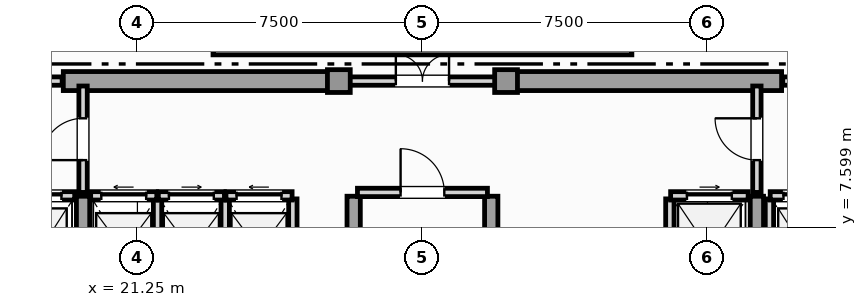
"""IFC4 building model, lengths in metres.
Left out: names, types, materials, properties, quantities, classifications, styles, units other than length and angle.
Written with IfcOpenShell. Run it as: python <this file> out.ifc"""

import sys

from ifc_helpers import new_model, si_unit, direction, frame, frame_2d, origin, origin_2d, place, context, subcontext, project, spatial, rectangle, extrude, element, fill, save


model = new_model("IFC4")
c1 = context("Model", 3, precision=1e-05, world=origin(), true_north=direction((0.0, 1.0)))
c2 = subcontext(c1, "Body", "Model", "MODEL_VIEW")
j1 = project(units=[si_unit("LENGTHUNIT", "METRE"), si_unit("PLANEANGLEUNIT", "RADIAN")], contexts=[c1])
p1 = place(None, origin())
s1 = spatial("IfcSite", under=j1, at=p1, CompositionType="ELEMENT")
p2 = place(p1, origin())
s2 = spatial("IfcBuilding", under=s1, at=p2, CompositionType="ELEMENT")
p3 = place(p2, frame((0.0, 0.0, 337.5)))
s3 = spatial("IfcBuildingStorey", under=s2, at=p3, CompositionType="ELEMENT", Elevation=337.5)
for number, where, z_axis, x_axis in (
    (1, (19.3, 11.45, 0.0), (0.0, 0.0, 1.0), (1.0, 0.0, 0.0)),
    (2, (30.9, 11.45, 0.0), (0.0, 0.0, 1.0), (1.0, 0.0, 0.0)),
):
    element("IfcWall", number, at=place(p3, frame(where, z_axis=z_axis, x_axis=x_axis)), inside=s3, PredefinedType="SHEAR", context=c2, shape_type="SweptSolid", body=[
        extrude(rectangle(XDim=7.3, YDim=0.5, at=frame_2d((3.65, 0.0))), origin(), (0.0, 0.0, 1.0), 3.63),
    ])
for number, where, z_axis, x_axis in (
    (3, (19.82, 0.92, 0.0), (0.0, 0.0, 1.0), (0.0, 1.0, 0.0)),
    (4, (26.94, 0.92, 0.0), (0.0, 0.0, 1.0), (0.0, 1.0, 0.0)),
    (5, (30.56, 0.92, 0.0), (0.0, 0.0, 1.0), (0.0, 1.0, 0.0)),
    (6, (37.55, 0.92, 0.0), (0.0, 0.0, 1.0), (0.0, 1.0, 0.0)),
):
    element("IfcWall", number, at=place(p3, frame(where, z_axis=z_axis, x_axis=x_axis)), inside=s3, PredefinedType="SHEAR", context=c2, shape_type="SweptSolid", body=[
        extrude(rectangle(XDim=7.5, YDim=0.35, at=frame_2d((3.75, 0.0))), origin(), (0.0, 0.0, 1.0), 3.63),
    ])
for number, where, z_axis, x_axis in (
    (7, (26.55, 11.45, 0.0), (0.0, 0.0, 1.0), (1.0, 0.0, 0.0)),
    (8, (30.95, 11.45, 0.0), (0.0, 0.0, 1.0), (1.0, 0.0, 0.0)),
):
    element("IfcColumn", number, at=place(p3, frame(where, z_axis=z_axis, x_axis=x_axis)), inside=s3, PredefinedType="COLUMN", context=c2, shape_type="SweptSolid", body=[
        extrude(rectangle(XDim=0.6, YDim=0.6, at=origin_2d()), origin(), (0.0, 0.0, 1.0), 3.85),
    ])
p4 = place(p3, frame((34.26, 12.27, 0.0), z_axis=(0.0, 0.0, 1.0), x_axis=(-1.0, 0.0, 0.0)))
e9 = element("IfcWall", 9, at=p4, inside=s3, PredefinedType="SOLIDWALL", context=c2, shape_type="SweptSolid", body=[
    extrude(rectangle(XDim=11.02, YDim=0.26, at=frame_2d((5.51, 0.0))), origin(), (0.0, 0.0, 1.0), 3.63),
])
p5 = place(p3, frame((17.78, 8.43, 0.0), z_axis=(0.0, 0.0, 1.0), x_axis=(1.0, 0.0, 0.0)))
e10 = element("IfcWall", 10, at=p5, inside=s3, PredefinedType="SOLIDWALL", context=c2, shape_type="SweptSolid", body=[
    extrude(rectangle(XDim=1.82, YDim=0.22, at=frame_2d((0.91, 0.0))), origin(), (0.0, 0.0, 1.0), 3.63),
])
p6 = place(p5, frame((0.35, 0.0, 0.0)))
e11 = element("IfcOpeningElement", 11, at=p6, cuts=e10, PredefinedType="OPENING", context=c2, shape_type="SweptSolid", body=[
    extrude(rectangle(XDim=1.12, YDim=2.25, at=frame_2d((0.56, 1.125))), frame((0.0, 0.12, 0.0), z_axis=(0.0, -1.0, 0.0), x_axis=(1.0, 0.0, 0.0)), (0.0, 0.0, 1.0), 0.24),
])
p7 = place(p3, frame((37.88, 5.65, 0.0), z_axis=(0.0, 0.0, 1.0), x_axis=(0.0, 1.0, 0.0)))
e12 = element("IfcWall", 12, at=p7, inside=s3, PredefinedType="SOLIDWALL", context=c2, shape_type="SweptSolid", body=[
    extrude(rectangle(XDim=2.7, YDim=0.22, at=frame_2d((1.35, 0.0))), origin(), (0.0, 0.0, 1.0), 3.63),
])
p8 = place(p3, frame((37.9, 8.43, 0.0), z_axis=(0.0, 0.0, 1.0), x_axis=(1.0, 0.0, 0.0)))
e13 = element("IfcWall", 13, at=p8, inside=s3, PredefinedType="SOLIDWALL", context=c2, shape_type="SweptSolid", body=[
    extrude(rectangle(XDim=1.82, YDim=0.22, at=frame_2d((0.91, 0.0))), origin(), (0.0, 0.0, 1.0), 3.63),
])
p9 = place(p8, frame((0.35, 0.0, 0.0)))
e14 = element("IfcOpeningElement", 14, at=p9, cuts=e13, PredefinedType="OPENING", context=c2, shape_type="SweptSolid", body=[
    extrude(rectangle(XDim=1.12, YDim=2.25, at=frame_2d((0.56, 1.125))), frame((0.0, 0.12, 0.0), z_axis=(0.0, -1.0, 0.0), x_axis=(1.0, 0.0, 0.0)), (0.0, 0.0, 1.0), 0.24),
])
p10 = place(p3, frame((35.26, 5.65, 0.0), z_axis=(0.0, 0.0, 1.0), x_axis=(0.0, 1.0, 0.0)))
e15 = element("IfcWall", 15, at=p10, inside=s3, PredefinedType="SOLIDWALL", context=c2, shape_type="SweptSolid", body=[
    extrude(rectangle(XDim=2.7, YDim=0.22, at=frame_2d((1.35, 0.0))), origin(), (0.0, 0.0, 1.0), 3.63),
])
p11 = place(p3, frame((35.28, 8.43, 0.0), z_axis=(0.0, 0.0, 1.0), x_axis=(1.0, 0.0, 0.0)))
e16 = element("IfcWall", 16, at=p11, inside=s3, PredefinedType="SOLIDWALL", context=c2, shape_type="SweptSolid", body=[
    extrude(rectangle(XDim=2.04, YDim=0.22, at=frame_2d((1.02, 0.0))), origin(), (0.0, 0.0, 1.0), 3.63),
])
p12 = place(p11, frame((0.43, 0.0, 0.0)))
e17 = element("IfcOpeningElement", 17, at=p12, cuts=e16, PredefinedType="OPENING", context=c2, shape_type="SweptSolid", body=[
    extrude(rectangle(XDim=1.18, YDim=2.2, at=frame_2d((0.59, 1.1))), frame((0.0, 0.12, 0.0), z_axis=(0.0, -1.0, 0.0), x_axis=(1.0, 0.0, 0.0)), (0.0, 0.0, 1.0), 0.24),
])
p13 = place(p3, frame((21.78, 5.65, 0.0), z_axis=(0.0, 0.0, 1.0), x_axis=(0.0, 1.0, 0.0)))
e18 = element("IfcWall", 18, at=p13, inside=s3, PredefinedType="SOLIDWALL", context=c2, shape_type="SweptSolid", body=[
    extrude(rectangle(XDim=2.7, YDim=0.22, at=frame_2d((1.35, 0.0))), origin(), (0.0, 0.0, 1.0), 3.63),
])
p14 = place(p3, frame((20.02, 8.43, 0.0), z_axis=(0.0, 0.0, 1.0), x_axis=(1.0, 0.0, 0.0)))
e19 = element("IfcWall", 19, at=p14, inside=s3, PredefinedType="SOLIDWALL", context=c2, shape_type="SweptSolid", body=[
    extrude(rectangle(XDim=1.74, YDim=0.22, at=frame_2d((0.87, 0.0))), origin(), (0.0, 0.0, 1.0), 3.63),
])
p15 = place(p14, frame((0.28, 0.0, 0.0)))
e20 = element("IfcOpeningElement", 20, at=p15, cuts=e19, PredefinedType="OPENING", context=c2, shape_type="SweptSolid", body=[
    extrude(rectangle(XDim=1.18, YDim=2.2, at=frame_2d((0.59, 1.1))), frame((0.0, 0.12, 0.0), z_axis=(0.0, -1.0, 0.0), x_axis=(1.0, 0.0, 0.0)), (0.0, 0.0, 1.0), 0.24),
])
p16 = place(p3, frame((23.56, 5.65, 0.0), z_axis=(0.0, 0.0, 1.0), x_axis=(0.0, 1.0, 0.0)))
e21 = element("IfcWall", 21, at=p16, inside=s3, PredefinedType="SOLIDWALL", context=c2, shape_type="SweptSolid", body=[
    extrude(rectangle(XDim=2.7, YDim=0.22, at=frame_2d((1.35, 0.0))), origin(), (0.0, 0.0, 1.0), 3.63),
])
p17 = place(p3, frame((21.8, 8.43, 0.0), z_axis=(0.0, 0.0, 1.0), x_axis=(1.0, 0.0, 0.0)))
e22 = element("IfcWall", 22, at=p17, inside=s3, PredefinedType="SOLIDWALL", context=c2, shape_type="SweptSolid", body=[
    extrude(rectangle(XDim=1.74, YDim=0.22, at=frame_2d((0.87, 0.0))), origin(), (0.0, 0.0, 1.0), 3.63),
])
p18 = place(p17, frame((0.28, 0.0, 0.0)))
e23 = element("IfcOpeningElement", 23, at=p18, cuts=e22, PredefinedType="OPENING", context=c2, shape_type="SweptSolid", body=[
    extrude(rectangle(XDim=1.18, YDim=2.2, at=frame_2d((0.59, 1.1))), frame((0.0, 0.12, 0.0), z_axis=(0.0, -1.0, 0.0), x_axis=(1.0, 0.0, 0.0)), (0.0, 0.0, 1.0), 0.24),
])
p19 = place(p3, frame((25.34, 5.65, 0.0), z_axis=(0.0, 0.0, 1.0), x_axis=(0.0, 1.0, 0.0)))
e24 = element("IfcWall", 24, at=p19, inside=s3, PredefinedType="SOLIDWALL", context=c2, shape_type="SweptSolid", body=[
    extrude(rectangle(XDim=2.7, YDim=0.22, at=frame_2d((1.35, 0.0))), origin(), (0.0, 0.0, 1.0), 3.63),
])
p20 = place(p3, frame((23.58, 8.43, 0.0), z_axis=(0.0, 0.0, 1.0), x_axis=(1.0, 0.0, 0.0)))
e25 = element("IfcWall", 25, at=p20, inside=s3, PredefinedType="SOLIDWALL", context=c2, shape_type="SweptSolid", body=[
    extrude(rectangle(XDim=1.74, YDim=0.22, at=frame_2d((0.87, 0.0))), origin(), (0.0, 0.0, 1.0), 3.63),
])
p21 = place(p20, frame((0.28, 0.0, 0.0)))
e26 = element("IfcOpeningElement", 26, at=p21, cuts=e25, PredefinedType="OPENING", context=c2, shape_type="SweptSolid", body=[
    extrude(rectangle(XDim=1.18, YDim=2.2, at=frame_2d((0.59, 1.1))), frame((0.0, 0.12, 0.0), z_axis=(0.0, -1.0, 0.0), x_axis=(1.0, 0.0, 0.0)), (0.0, 0.0, 1.0), 0.24),
])
p22 = place(p3, frame((27.04, 8.52, 0.0), z_axis=(0.0, 0.0, 1.0), x_axis=(1.0, 0.0, 0.0)))
e27 = element("IfcWall", 27, at=p22, inside=s3, PredefinedType="SOLIDWALL", context=c2, shape_type="SweptSolid", body=[
    extrude(rectangle(XDim=3.42, YDim=0.22, at=frame_2d((1.71, 0.0))), origin(), (0.0, 0.0, 1.0), 3.63),
])
p23 = place(p22, frame((1.135, 0.0, 0.0)))
e28 = element("IfcOpeningElement", 28, at=p23, cuts=e27, PredefinedType="OPENING", context=c2, shape_type="SweptSolid", body=[
    extrude(rectangle(XDim=1.15, YDim=2.2, at=frame_2d((0.575, 1.1))), frame((0.0, 0.12, 0.0), z_axis=(0.0, -1.0, 0.0), x_axis=(1.0, 0.0, 0.0)), (0.0, 0.0, 1.0), 0.24),
])
p24 = place(p3, frame((19.82, 8.52, 0.0), z_axis=(0.0, 0.0, 1.0), x_axis=(0.0, 1.0, 0.0)))
e29 = element("IfcWall", 29, at=p24, inside=s3, PredefinedType="SOLIDWALL", context=c2, shape_type="SweptSolid", body=[
    extrude(rectangle(XDim=2.8, YDim=0.22, at=frame_2d((1.4, 0.0))), origin(), (0.0, 0.0, 1.0), 3.085),
])
p25 = place(p24, frame((0.85, 0.0, 0.0)))
e30 = element("IfcOpeningElement", 30, at=p25, cuts=e29, PredefinedType="OPENING", context=c2, shape_type="SweptSolid", body=[
    extrude(rectangle(XDim=1.1, YDim=2.2, at=frame_2d((0.55, 1.1))), frame((0.0, 0.12, 0.0), z_axis=(0.0, -1.0, 0.0), x_axis=(1.0, 0.0, 0.0)), (0.0, 0.0, 1.0), 0.24),
])
p26 = place(p3, frame((37.55, 8.52, 0.0), z_axis=(0.0, 0.0, 1.0), x_axis=(0.0, 1.0, 0.0)))
e31 = element("IfcWall", 31, at=p26, inside=s3, PredefinedType="SOLIDWALL", context=c2, shape_type="SweptSolid", body=[
    extrude(rectangle(XDim=2.8, YDim=0.22, at=frame_2d((1.4, 0.0))), origin(), (0.0, 0.0, 1.0), 3.085),
])
p27 = place(p26, frame((0.85, 0.0, 0.0)))
e32 = element("IfcOpeningElement", 32, at=p27, cuts=e31, PredefinedType="OPENING", context=c2, shape_type="SweptSolid", body=[
    extrude(rectangle(XDim=1.1, YDim=2.2, at=frame_2d((0.55, 1.1))), frame((0.0, 0.12, 0.0), z_axis=(0.0, -1.0, 0.0), x_axis=(1.0, 0.0, 0.0)), (0.0, 0.0, 1.0), 0.24),
])
p28 = place(p3, frame((16.23, 11.45, 0.0), z_axis=(0.0, 0.0, 1.0), x_axis=(1.0, 0.0, 0.0)))
e33 = element("IfcWall", 33, at=p28, inside=s3, PredefinedType="SOLIDWALL", context=c2, shape_type="SweptSolid", body=[
    extrude(rectangle(XDim=3.04, YDim=0.22, at=frame_2d((1.52, 0.0))), origin(), (0.0, 0.0, 1.0), 3.63),
])
p29 = place(p28, frame((0.97, 0.0, 0.0)))
e34 = element("IfcOpeningElement", 34, at=p29, cuts=e33, PredefinedType="OPENING", context=c2, shape_type="SweptSolid", body=[
    extrude(rectangle(XDim=1.1, YDim=2.2, at=frame_2d((0.55, 1.1))), frame((0.0, 0.12, 0.0), z_axis=(0.0, -1.0, 0.0), x_axis=(1.0, 0.0, 0.0)), (0.0, 0.0, 1.0), 0.24),
])
p30 = place(p3, frame((26.63, 11.45, 0.0), z_axis=(0.0, 0.0, 1.0), x_axis=(1.0, 0.0, 0.0)))
e35 = element("IfcWall", 35, at=p30, inside=s3, PredefinedType="SOLIDWALL", context=c2, shape_type="SweptSolid", body=[
    extrude(rectangle(XDim=4.24, YDim=0.22, at=frame_2d((2.12, 0.0))), origin(), (0.0, 0.0, 1.0), 3.63),
])
p31 = place(p30, frame((1.42, 0.0, 0.0)))
e36 = element("IfcOpeningElement", 36, at=p31, cuts=e35, PredefinedType="OPENING", context=c2, shape_type="SweptSolid", body=[
    extrude(rectangle(XDim=1.4, YDim=2.2, at=frame_2d((0.7, 1.1))), frame((0.0, 0.12, 0.0), z_axis=(0.0, -1.0, 0.0), x_axis=(1.0, 0.0, 0.0)), (0.0, 0.0, 1.0), 0.24),
])
p32 = place(p3, frame((38.23, 11.45, 0.0), z_axis=(0.0, 0.0, 1.0), x_axis=(1.0, 0.0, 0.0)))
e37 = element("IfcWall", 37, at=p32, inside=s3, PredefinedType="SOLIDWALL", context=c2, shape_type="SweptSolid", body=[
    extrude(rectangle(XDim=3.04, YDim=0.22, at=frame_2d((1.52, 0.0))), origin(), (0.0, 0.0, 1.0), 3.63),
])
p33 = place(p32, frame((0.97, 0.0, 0.0)))
e38 = element("IfcOpeningElement", 38, at=p33, cuts=e37, PredefinedType="OPENING", context=c2, shape_type="SweptSolid", body=[
    extrude(rectangle(XDim=1.1, YDim=2.2, at=frame_2d((0.55, 1.1))), frame((0.0, 0.12, 0.0), z_axis=(0.0, -1.0, 0.0), x_axis=(1.0, 0.0, 0.0)), (0.0, 0.0, 1.0), 0.24),
])
p34 = place(p6, origin())
e39 = element("IfcDoor", 39, at=p34, inside=s3, OperationType="SLIDING_TO_RIGHT", PredefinedType="DOOR", context=c2, shape_type="SweptSolid", body=[
    extrude(rectangle(XDim=1.12, YDim=2.25, at=frame_2d((0.56, 1.125))), frame((0.0, 0.025, 0.0), z_axis=(0.0, -1.0, 0.0), x_axis=(1.0, 0.0, 0.0)), (0.0, 0.0, 1.0), 0.05),
])
fill(e11, e39)
p35 = place(p9, origin())
e40 = element("IfcDoor", 40, at=p35, inside=s3, OperationType="SLIDING_TO_LEFT", PredefinedType="DOOR", context=c2, shape_type="SweptSolid", body=[
    extrude(rectangle(XDim=1.12, YDim=2.25, at=frame_2d((0.56, 1.125))), frame((0.0, 0.025, 0.0), z_axis=(0.0, -1.0, 0.0), x_axis=(1.0, 0.0, 0.0)), (0.0, 0.0, 1.0), 0.05),
])
fill(e14, e40)
p36 = place(p12, origin())
e41 = element("IfcDoor", 41, at=p36, inside=s3, OperationType="SLIDING_TO_RIGHT", PredefinedType="DOOR", context=c2, shape_type="SweptSolid", body=[
    extrude(rectangle(XDim=1.18, YDim=2.2, at=frame_2d((0.59, 1.1))), frame((0.0, 0.025, 0.0), z_axis=(0.0, -1.0, 0.0), x_axis=(1.0, 0.0, 0.0)), (0.0, 0.0, 1.0), 0.05),
])
fill(e17, e41)
p37 = place(p15, origin())
e42 = element("IfcDoor", 42, at=p37, inside=s3, OperationType="SLIDING_TO_LEFT", PredefinedType="DOOR", context=c2, shape_type="SweptSolid", body=[
    extrude(rectangle(XDim=1.18, YDim=2.2, at=frame_2d((0.59, 1.1))), frame((0.0, 0.025, 0.0), z_axis=(0.0, -1.0, 0.0), x_axis=(1.0, 0.0, 0.0)), (0.0, 0.0, 1.0), 0.05),
])
fill(e20, e42)
p38 = place(p18, origin())
e43 = element("IfcDoor", 43, at=p38, inside=s3, OperationType="SLIDING_TO_RIGHT", PredefinedType="DOOR", context=c2, shape_type="SweptSolid", body=[
    extrude(rectangle(XDim=1.18, YDim=2.2, at=frame_2d((0.59, 1.1))), frame((0.0, 0.025, 0.0), z_axis=(0.0, -1.0, 0.0), x_axis=(1.0, 0.0, 0.0)), (0.0, 0.0, 1.0), 0.05),
])
fill(e23, e43)
p39 = place(p21, origin())
e44 = element("IfcDoor", 44, at=p39, inside=s3, OperationType="SLIDING_TO_LEFT", PredefinedType="DOOR", context=c2, shape_type="SweptSolid", body=[
    extrude(rectangle(XDim=1.18, YDim=2.2, at=frame_2d((0.59, 1.1))), frame((0.0, 0.025, 0.0), z_axis=(0.0, -1.0, 0.0), x_axis=(1.0, 0.0, 0.0)), (0.0, 0.0, 1.0), 0.05),
])
fill(e26, e44)
p40 = place(p23, origin())
e45 = element("IfcDoor", 45, at=p40, inside=s3, OperationType="SINGLE_SWING_LEFT", PredefinedType="DOOR", context=c2, shape_type="SweptSolid", body=[
    extrude(rectangle(XDim=1.15, YDim=2.2, at=frame_2d((0.575, 1.1))), frame((0.0, 0.025, 0.0), z_axis=(0.0, -1.0, 0.0), x_axis=(1.0, 0.0, 0.0)), (0.0, 0.0, 1.0), 0.05),
])
fill(e28, e45)
p41 = place(p25, origin())
e46 = element("IfcDoor", 46, at=p41, inside=s3, OperationType="SINGLE_SWING_LEFT", PredefinedType="DOOR", context=c2, shape_type="SweptSolid", body=[
    extrude(rectangle(XDim=1.1, YDim=2.2, at=frame_2d((0.55, 1.1))), frame((0.0, 0.025, 0.0), z_axis=(0.0, -1.0, 0.0), x_axis=(1.0, 0.0, 0.0)), (0.0, 0.0, 1.0), 0.05),
])
fill(e30, e46)
p42 = place(p27, origin())
e47 = element("IfcDoor", 47, at=p42, inside=s3, OperationType="SINGLE_SWING_RIGHT", PredefinedType="DOOR", context=c2, shape_type="SweptSolid", body=[
    extrude(rectangle(XDim=1.1, YDim=2.2, at=frame_2d((0.55, 1.1))), frame((0.0, 0.025, 0.0), z_axis=(0.0, -1.0, 0.0), x_axis=(1.0, 0.0, 0.0)), (0.0, 0.0, 1.0), 0.05),
])
fill(e32, e47)
p43 = place(p31, origin())
e48 = element("IfcDoor", 48, at=p43, inside=s3, OperationType="DOUBLE_DOOR_SINGLE_SWING", PredefinedType="DOOR", context=c2, shape_type="SweptSolid", body=[
    extrude(rectangle(XDim=1.4, YDim=2.2, at=frame_2d((0.7, 1.1))), frame((0.0, 0.025, 0.0), z_axis=(0.0, -1.0, 0.0), x_axis=(1.0, 0.0, 0.0)), (0.0, 0.0, 1.0), 0.05),
])
fill(e36, e48)
save(model, sys.argv[1])
